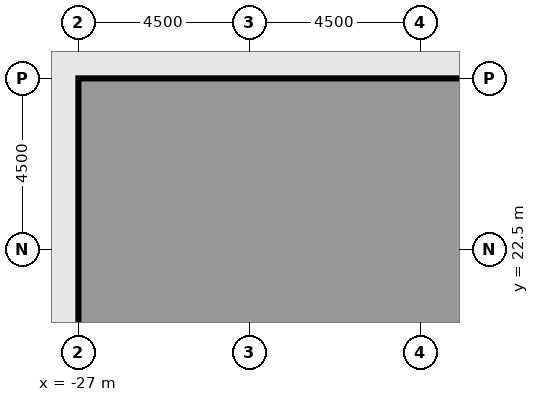
"""IFC4 building model, lengths in metres.
Left out: names, types, materials, properties, quantities, classifications, styles, units other than length and angle.
Written with IfcOpenShell. Run it as: python <this file> out.ifc"""

import sys

from ifc_helpers import new_model, si_unit, direction, frame, frame_2d, origin, origin_2d, place, context, subcontext, project, spatial, rectangle, extrude, element, fill, save


model = new_model("IFC4")
c1 = context("Model", 3, precision=1e-05, world=origin(), true_north=direction((0.0, 1.0)))
c2 = subcontext(c1, "Body", "Model", "MODEL_VIEW")
j1 = project(units=[si_unit("LENGTHUNIT", "METRE"), si_unit("PLANEANGLEUNIT", "RADIAN")], contexts=[c1])
p1 = place(None, origin())
s1 = spatial("IfcSite", under=j1, at=p1, CompositionType="ELEMENT")
p2 = place(p1, origin())
s2 = spatial("IfcBuilding", under=s1, at=p2, CompositionType="ELEMENT")
p3 = place(p2, frame((0.0, 0.0, 7.2)))
s3 = spatial("IfcBuildingStorey", under=s2, at=p3, CompositionType="ELEMENT", Elevation=7.2)
for number, where, z_axis, x_axis in (
    (1, (-27.0, 22.5, -0.45), (0.0, 0.0, 1.0), (1.0, 0.0, 0.0)),
    (2, (-22.5, 27.0, -0.45), (0.0, 0.0, 1.0), (1.0, 0.0, 0.0)),
    (3, (-18.0, 27.0, -0.45), (0.0, 0.0, 1.0), (1.0, 0.0, 0.0)),
):
    element("IfcColumn", number, at=place(p3, frame(where, z_axis=z_axis, x_axis=x_axis)), inside=s3, PredefinedType="COLUMN", context=c2, shape_type="SweptSolid", body=[
        extrude(rectangle(XDim=1.4, YDim=1.4, at=origin_2d()), origin(), (0.0, 0.0, 1.0), 4.55),
    ])
p4 = place(p3, frame((-18.0, 22.5, 0.0), z_axis=(0.0, 0.0, 1.0), x_axis=(1.0, 0.0, 0.0)))
e4 = element("IfcColumn", 4, at=p4, inside=s3, PredefinedType="COLUMN", context=c2, shape_type="SweptSolid", body=[
    extrude(rectangle(XDim=1.6, YDim=1.6, at=origin_2d()), origin(), (0.0, 0.0, 1.0), 4.1),
])
p5 = place(p3, frame((-17.3, 27.0, 0.0), z_axis=(0.0, 0.0, 1.0), x_axis=(1.0, 0.0, 0.0)))
e5 = element("IfcWall", 5, at=p5, inside=s3, PredefinedType="SOLIDWALL", context=c2, shape_type="SweptSolid", body=[
    extrude(rectangle(XDim=3.1, YDim=0.3, at=frame_2d((1.55, 0.0))), origin(), (0.0, 0.0, 1.0), 2.75),
])
p6 = place(p5, frame((1.05, 0.0, 0.0)))
e6 = element("IfcOpeningElement", 6, at=p6, cuts=e5, PredefinedType="OPENING", context=c2, shape_type="SweptSolid", body=[
    extrude(rectangle(XDim=1.0, YDim=2.2, at=frame_2d((0.5, 1.1))), frame((0.0, 0.16, 0.0), z_axis=(0.0, -1.0, 0.0), x_axis=(1.0, 0.0, 0.0)), (0.0, 0.0, 1.0), 0.32),
])
p7 = place(p3, frame((-21.8, 27.0, 0.0), z_axis=(0.0, 0.0, 1.0), x_axis=(1.0, 0.0, 0.0)))
e7 = element("IfcWall", 7, at=p7, inside=s3, PredefinedType="SOLIDWALL", context=c2, shape_type="SweptSolid", body=[
    extrude(rectangle(XDim=3.1, YDim=0.3, at=frame_2d((1.55, 0.0))), origin(), (0.0, 0.0, 1.0), 2.75),
])
p8 = place(p7, frame((0.35, 0.0, 0.8)))
e8 = element("IfcOpeningElement", 8, at=p8, cuts=e7, PredefinedType="OPENING", context=c2, shape_type="SweptSolid", body=[
    extrude(rectangle(XDim=2.4, YDim=1.7, at=frame_2d((1.2, 0.85))), frame((0.0, 0.16, 0.0), z_axis=(0.0, -1.0, 0.0), x_axis=(1.0, 0.0, 0.0)), (0.0, 0.0, 1.0), 0.32),
])
p9 = place(p3, frame((-26.406, 23.094, 0.0), z_axis=(0.0, 0.0, 1.0), x_axis=(0.707106781187, 0.707106781187, 0.0)))
e9 = element("IfcWall", 9, at=p9, inside=s3, PredefinedType="SOLIDWALL", context=c2, shape_type="SweptSolid", body=[
    extrude(rectangle(XDim=4.684, YDim=0.3, at=frame_2d((2.342, 0.0))), origin(), (0.0, 0.0, 1.0), 2.75),
])
p10 = place(p9, frame((1.142, 0.0, 0.8)))
e10 = element("IfcOpeningElement", 10, at=p10, cuts=e9, PredefinedType="OPENING", context=c2, shape_type="SweptSolid", body=[
    extrude(rectangle(XDim=2.4, YDim=1.7, at=frame_2d((1.2, 0.85))), frame((0.0, 0.16, 0.0), z_axis=(0.0, -1.0, 0.0), x_axis=(1.0, 0.0, 0.0)), (0.0, 0.0, 1.0), 0.32),
])
p11 = place(p3, frame((-27.0, 18.7, 0.0), z_axis=(0.0, 0.0, 1.0), x_axis=(0.0, 1.0, 0.0)))
e11 = element("IfcWall", 11, at=p11, inside=s3, PredefinedType="SOLIDWALL", context=c2, shape_type="SweptSolid", body=[
    extrude(rectangle(XDim=3.1, YDim=0.3, at=frame_2d((1.55, 0.0))), origin(), (0.0, 0.0, 1.0), 2.75),
])
p12 = place(p11, frame((0.125, 0.0, 0.8)))
e12 = element("IfcOpeningElement", 12, at=p12, cuts=e11, PredefinedType="OPENING", context=c2, shape_type="SweptSolid", body=[
    extrude(rectangle(XDim=2.4, YDim=1.7, at=frame_2d((1.2, 0.85))), frame((0.0, 0.16, 0.0), z_axis=(0.0, -1.0, 0.0), x_axis=(1.0, 0.0, 0.0)), (0.0, 0.0, 1.0), 0.32),
])
p13 = place(p3, frame((-18.0, 23.3, 0.0), z_axis=(0.0, 0.0, 1.0), x_axis=(0.0, 1.0, 0.0)))
e13 = element("IfcWall", 13, at=p13, inside=s3, PredefinedType="PARTITIONING", context=c2, shape_type="SweptSolid", body=[
    extrude(rectangle(XDim=3.0, YDim=0.2, at=frame_2d((1.5, 0.0))), origin(), (0.0, 0.0, 1.0), 3.65),
])
p14 = place(p3, frame((-26.85, 21.5, 0.0), z_axis=(0.0, 0.0, 1.0), x_axis=(1.0, 0.0, 0.0)))
e14 = element("IfcWall", 14, at=p14, inside=s3, PredefinedType="PARTITIONING", context=c2, shape_type="SweptSolid", body=[
    extrude(rectangle(XDim=53.7, YDim=0.2, at=frame_2d((26.85, 0.0))), origin(), (0.0, 0.0, 1.0), 3.65),
])
p15 = place(p14, frame((2.7, 0.0, 0.0)))
e15 = element("IfcOpeningElement", 15, at=p15, cuts=e14, PredefinedType="OPENING", context=c2, shape_type="SweptSolid", body=[
    extrude(rectangle(XDim=1.0, YDim=2.1, at=frame_2d((0.5, 1.05))), frame((0.0, 0.11, 0.0), z_axis=(0.0, -1.0, 0.0), x_axis=(1.0, 0.0, 0.0)), (0.0, 0.0, 1.0), 0.22),
])
p16 = place(p14, frame((12.95, 0.0, 0.0)))
e16 = element("IfcOpeningElement", 16, at=p16, cuts=e14, PredefinedType="OPENING", context=c2, shape_type="SweptSolid", body=[
    extrude(rectangle(XDim=1.0, YDim=2.1, at=frame_2d((0.5, 1.05))), frame((0.0, 0.11, 0.0), z_axis=(0.0, -1.0, 0.0), x_axis=(1.0, 0.0, 0.0)), (0.0, 0.0, 1.0), 0.22),
])
p17 = place(p14, frame((27.7, 0.0, 0.0)))
e17 = element("IfcOpeningElement", 17, at=p17, cuts=e14, PredefinedType="OPENING", context=c2, shape_type="SweptSolid", body=[
    extrude(rectangle(XDim=1.0, YDim=2.1, at=frame_2d((0.5, 1.05))), frame((0.0, 0.11, 0.0), z_axis=(0.0, -1.0, 0.0), x_axis=(1.0, 0.0, 0.0)), (0.0, 0.0, 1.0), 0.22),
])
p18 = place(p14, frame((33.95, 0.0, 0.0)))
e18 = element("IfcOpeningElement", 18, at=p18, cuts=e14, PredefinedType="OPENING", context=c2, shape_type="SweptSolid", body=[
    extrude(rectangle(XDim=1.0, YDim=2.1, at=frame_2d((0.5, 1.05))), frame((0.0, 0.11, 0.0), z_axis=(0.0, -1.0, 0.0), x_axis=(1.0, 0.0, 0.0)), (0.0, 0.0, 1.0), 0.22),
])
p19 = place(p14, frame((42.2, 0.0, 0.0)))
e19 = element("IfcOpeningElement", 19, at=p19, cuts=e14, PredefinedType="OPENING", context=c2, shape_type="SweptSolid", body=[
    extrude(rectangle(XDim=1.0, YDim=2.1, at=frame_2d((0.5, 1.05))), frame((0.0, 0.11, 0.0), z_axis=(0.0, -1.0, 0.0), x_axis=(1.0, 0.0, 0.0)), (0.0, 0.0, 1.0), 0.22),
])
p20 = place(p14, frame((47.45, 0.0, 0.0)))
e20 = element("IfcOpeningElement", 20, at=p20, cuts=e14, PredefinedType="OPENING", context=c2, shape_type="SweptSolid", body=[
    extrude(rectangle(XDim=1.0, YDim=2.1, at=frame_2d((0.5, 1.05))), frame((0.0, 0.11, 0.0), z_axis=(0.0, -1.0, 0.0), x_axis=(1.0, 0.0, 0.0)), (0.0, 0.0, 1.0), 0.22),
])
p21 = place(p8, origin())
e21 = element("IfcWindow", 21, at=p21, inside=s3, PartitioningType="SINGLE_PANEL", PredefinedType="WINDOW", context=c2, shape_type="SweptSolid", body=[
    extrude(rectangle(XDim=2.4, YDim=1.7, at=frame_2d((1.2, 0.85))), frame((0.0, 0.03, 0.0), z_axis=(0.0, -1.0, 0.0), x_axis=(1.0, 0.0, 0.0)), (0.0, 0.0, 1.0), 0.06),
])
fill(e8, e21)
p22 = place(p10, origin())
e22 = element("IfcWindow", 22, at=p22, inside=s3, PartitioningType="SINGLE_PANEL", PredefinedType="WINDOW", context=c2, shape_type="SweptSolid", body=[
    extrude(rectangle(XDim=2.4, YDim=1.7, at=frame_2d((1.2, 0.85))), frame((0.0, 0.03, 0.0), z_axis=(0.0, -1.0, 0.0), x_axis=(1.0, 0.0, 0.0)), (0.0, 0.0, 1.0), 0.06),
])
fill(e10, e22)
p23 = place(p12, origin())
e23 = element("IfcWindow", 23, at=p23, inside=s3, PartitioningType="SINGLE_PANEL", PredefinedType="WINDOW", context=c2, shape_type="SweptSolid", body=[
    extrude(rectangle(XDim=2.4, YDim=1.7, at=frame_2d((1.2, 0.85))), frame((0.0, 0.03, 0.0), z_axis=(0.0, -1.0, 0.0), x_axis=(1.0, 0.0, 0.0)), (0.0, 0.0, 1.0), 0.06),
])
fill(e12, e23)
p24 = place(p15, origin())
e24 = element("IfcDoor", 24, at=p24, inside=s3, OperationType="SINGLE_SWING_LEFT", PredefinedType="DOOR", context=c2, shape_type="SweptSolid", body=[
    extrude(rectangle(XDim=1.0, YDim=2.1, at=frame_2d((0.5, 1.05))), frame((0.0, 0.025, 0.0), z_axis=(0.0, -1.0, 0.0), x_axis=(1.0, 0.0, 0.0)), (0.0, 0.0, 1.0), 0.05),
])
fill(e15, e24)
save(model, sys.argv[1])
